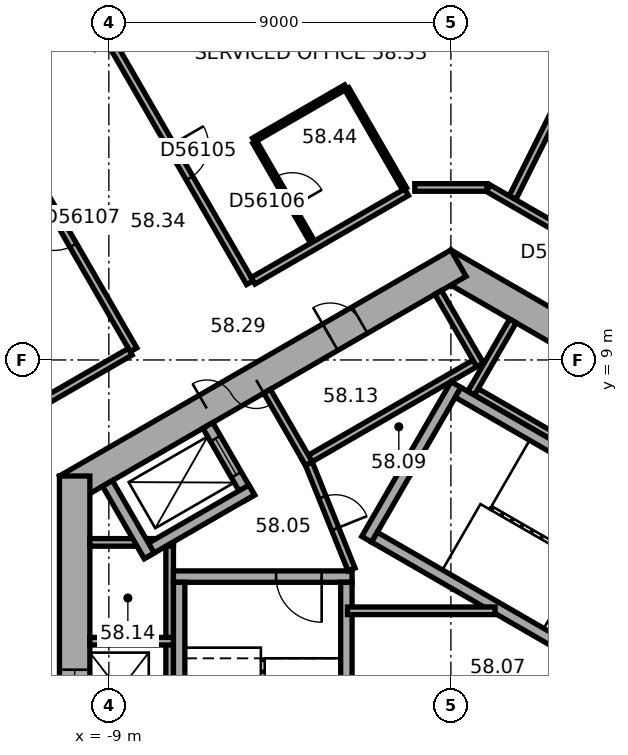
"""IFC4 building model, lengths in metres.
Left out: names, types, materials, properties, quantities, classifications, styles, units other than length and angle.
Written with IfcOpenShell. Run it as: python <this file> out.ifc"""

import sys

from ifc_helpers import new_model, si_unit, direction, frame, frame_2d, origin, place, context, subcontext, project, spatial, rectangle, extrude, element, fill, save


model = new_model("IFC4")
c1 = context("Model", 3, precision=1e-05, world=origin(), true_north=direction((0.0, 1.0)))
c2 = subcontext(c1, "Body", "Model", "MODEL_VIEW")
j1 = project(units=[si_unit("LENGTHUNIT", "METRE"), si_unit("PLANEANGLEUNIT", "RADIAN")], contexts=[c1])
p1 = place(None, origin())
s1 = spatial("IfcSite", under=j1, at=p1, CompositionType="ELEMENT")
p2 = place(p1, origin())
s2 = spatial("IfcBuilding", under=s1, at=p2, CompositionType="ELEMENT")
p3 = place(p2, frame((0.0, 0.0, 236.5)))
s3 = spatial("IfcBuildingStorey", under=s2, at=p3, CompositionType="ELEMENT", Elevation=236.5)
p4 = place(p3, frame((10.1, 5.6, 0.0), z_axis=(0.0, 0.0, 1.0), x_axis=(-0.866023897231, 0.500002609418, 0.0)))
e1 = element("IfcWall", 1, at=p4, inside=s3, PredefinedType="SHEAR", context=c2, shape_type="SweptSolid", body=[
    extrude(rectangle(XDim=11.894, YDim=0.8, at=frame_2d((5.947, 0.0))), origin(), (0.0, 0.0, 1.0), 3.7),
])
p5 = place(p4, frame((2.597, 0.0, 0.0)))
e2 = element("IfcOpeningElement", 2, at=p5, cuts=e1, PredefinedType="OPENING", context=c2, shape_type="SweptSolid", body=[
    extrude(rectangle(XDim=0.9, YDim=2.1, at=frame_2d((0.45, 1.05))), frame((0.0, 0.41, 0.0), z_axis=(0.0, -1.0, 0.0), x_axis=(1.0, 0.0, 0.0)), (0.0, 0.0, 1.0), 0.82),
])
p6 = place(p4, frame((6.497, 0.0, 0.0)))
e3 = element("IfcOpeningElement", 3, at=p6, cuts=e1, PredefinedType="OPENING", context=c2, shape_type="SweptSolid", body=[
    extrude(rectangle(XDim=0.9, YDim=2.1, at=frame_2d((0.45, 1.05))), frame((0.0, 0.41, 0.0), z_axis=(0.0, -1.0, 0.0), x_axis=(1.0, 0.0, 0.0)), (0.0, 0.0, 1.0), 0.82),
])
p7 = place(p3, frame((0.2, 11.547, 0.0), z_axis=(0.0, 0.0, 1.0), x_axis=(-0.866023897231, -0.500002609418, 0.0)))
e4 = element("IfcWall", 4, at=p7, inside=s3, PredefinedType="SHEAR", context=c2, shape_type="SweptSolid", body=[
    extrude(rectangle(XDim=11.894, YDim=0.8, at=frame_2d((5.947, 0.0))), origin(), (0.0, 0.0, 1.0), 3.7),
])
p8 = place(p7, frame((6.147, 0.0, 0.0)))
e5 = element("IfcOpeningElement", 5, at=p8, cuts=e4, PredefinedType="OPENING", context=c2, shape_type="SweptSolid", body=[
    extrude(rectangle(XDim=1.5, YDim=2.1, at=frame_2d((0.75, 1.05))), frame((0.0, 0.41, 0.0), z_axis=(0.0, -1.0, 0.0), x_axis=(1.0, 0.0, 0.0)), (0.0, 0.0, 1.0), 0.82),
])
p9 = place(p7, frame((2.997, 0.0, 0.0)))
e6 = element("IfcOpeningElement", 6, at=p9, cuts=e4, PredefinedType="OPENING", context=c2, shape_type="SweptSolid", body=[
    extrude(rectangle(XDim=0.9, YDim=2.1, at=frame_2d((0.45, 1.05))), frame((0.0, 0.41, 0.0), z_axis=(0.0, -1.0, 0.0), x_axis=(1.0, 0.0, 0.0)), (0.0, 0.0, 1.0), 0.82),
])
p10 = place(p3, frame((-9.9, 5.947, 0.0), z_axis=(0.0, 0.0, 1.0), x_axis=(0.0, -1.0, 0.0)))
e7 = element("IfcWall", 7, at=p10, inside=s3, PredefinedType="SHEAR", context=c2, shape_type="SweptSolid", body=[
    extrude(rectangle(XDim=11.894, YDim=0.8, at=frame_2d((5.947, 0.0))), origin(), (0.0, 0.0, 1.0), 3.7),
])
p11 = place(p10, frame((5.097, 0.0, 0.0)))
e8 = element("IfcOpeningElement", 8, at=p11, cuts=e7, PredefinedType="OPENING", context=c2, shape_type="SweptSolid", body=[
    extrude(rectangle(XDim=1.1, YDim=2.1, at=frame_2d((0.55, 1.05))), frame((0.0, 0.41, 0.0), z_axis=(0.0, -1.0, 0.0), x_axis=(1.0, 0.0, 0.0)), (0.0, 0.0, 1.0), 0.82),
])
p12 = place(p10, frame((7.697, 0.0, 0.0)))
e9 = element("IfcOpeningElement", 9, at=p12, cuts=e7, PredefinedType="OPENING", context=c2, shape_type="SweptSolid", body=[
    extrude(rectangle(XDim=1.1, YDim=2.1, at=frame_2d((0.55, 1.05))), frame((0.0, 0.41, 0.0), z_axis=(0.0, -1.0, 0.0), x_axis=(1.0, 0.0, 0.0)), (0.0, 0.0, 1.0), 0.82),
])
p13 = place(p3, frame((18.299, 13.727, 0.0), z_axis=(0.0, 0.0, 1.0), x_axis=(-0.894934554817, 0.44619742558, 0.0)))
e10 = element("IfcWall", 10, at=p13, inside=s3, PredefinedType="STANDARD", context=c2, shape_type="SweptSolid", body=[
    extrude(rectangle(XDim=18.841, YDim=0.2, at=frame_2d((9.421, 0.0))), origin(), (0.0, 0.0, 1.0), 3.7),
])
p14 = place(p13, frame((1.253, 0.0, 0.9)))
e11 = element("IfcOpeningElement", 11, at=p14, cuts=e10, PredefinedType="OPENING", context=c2, shape_type="SweptSolid", body=[
    extrude(rectangle(XDim=2.2, YDim=2.0, at=frame_2d((1.1, 1.0))), frame((0.0, 0.11, 0.0), z_axis=(0.0, -1.0, 0.0), x_axis=(1.0, 0.0, 0.0)), (0.0, 0.0, 1.0), 0.22),
])
p15 = place(p13, frame((4.786, 0.0, 0.9)))
e12 = element("IfcOpeningElement", 12, at=p15, cuts=e10, PredefinedType="OPENING", context=c2, shape_type="SweptSolid", body=[
    extrude(rectangle(XDim=2.2, YDim=2.0, at=frame_2d((1.1, 1.0))), frame((0.0, 0.11, 0.0), z_axis=(0.0, -1.0, 0.0), x_axis=(1.0, 0.0, 0.0)), (0.0, 0.0, 1.0), 0.22),
])
p16 = place(p13, frame((8.32, 0.0, 0.9)))
e13 = element("IfcOpeningElement", 13, at=p16, cuts=e10, PredefinedType="OPENING", context=c2, shape_type="SweptSolid", body=[
    extrude(rectangle(XDim=2.2, YDim=2.0, at=frame_2d((1.1, 1.0))), frame((0.0, 0.11, 0.0), z_axis=(0.0, -1.0, 0.0), x_axis=(1.0, 0.0, 0.0)), (0.0, 0.0, 1.0), 0.22),
])
p17 = place(p13, frame((11.854, 0.0, 0.9)))
e14 = element("IfcOpeningElement", 14, at=p17, cuts=e10, PredefinedType="OPENING", context=c2, shape_type="SweptSolid", body=[
    extrude(rectangle(XDim=2.2, YDim=2.0, at=frame_2d((1.1, 1.0))), frame((0.0, 0.11, 0.0), z_axis=(0.0, -1.0, 0.0), x_axis=(1.0, 0.0, 0.0)), (0.0, 0.0, 1.0), 0.22),
])
p18 = place(p13, frame((15.387, 0.0, 0.9)))
e15 = element("IfcOpeningElement", 15, at=p18, cuts=e10, PredefinedType="OPENING", context=c2, shape_type="SweptSolid", body=[
    extrude(rectangle(XDim=2.2, YDim=2.0, at=frame_2d((1.1, 1.0))), frame((0.0, 0.11, 0.0), z_axis=(0.0, -1.0, 0.0), x_axis=(1.0, 0.0, 0.0)), (0.0, 0.0, 1.0), 0.22),
])
p19 = place(p3, frame((-2.786, 22.005, 0.0), z_axis=(0.0, 0.0, 1.0), x_axis=(-0.866026555358, -0.49999800541, 0.0)))
e16 = element("IfcWall", 16, at=p19, inside=s3, PredefinedType="STANDARD", context=c2, shape_type="SweptSolid", body=[
    extrude(rectangle(XDim=18.841, YDim=0.2, at=frame_2d((9.421, 0.0))), origin(), (0.0, 0.0, 1.0), 3.7),
])
p20 = place(p19, frame((1.254, 0.0, 0.9)))
e17 = element("IfcOpeningElement", 17, at=p20, cuts=e16, PredefinedType="OPENING", context=c2, shape_type="SweptSolid", body=[
    extrude(rectangle(XDim=2.2, YDim=2.0, at=frame_2d((1.1, 1.0))), frame((0.0, 0.11, 0.0), z_axis=(0.0, -1.0, 0.0), x_axis=(1.0, 0.0, 0.0)), (0.0, 0.0, 1.0), 0.22),
])
p21 = place(p19, frame((4.788, 0.0, 0.9)))
e18 = element("IfcOpeningElement", 18, at=p21, cuts=e16, PredefinedType="OPENING", context=c2, shape_type="SweptSolid", body=[
    extrude(rectangle(XDim=2.2, YDim=2.0, at=frame_2d((1.1, 1.0))), frame((0.0, 0.11, 0.0), z_axis=(0.0, -1.0, 0.0), x_axis=(1.0, 0.0, 0.0)), (0.0, 0.0, 1.0), 0.22),
])
p22 = place(p19, frame((8.321, 0.0, 0.9)))
e19 = element("IfcOpeningElement", 19, at=p22, cuts=e16, PredefinedType="OPENING", context=c2, shape_type="SweptSolid", body=[
    extrude(rectangle(XDim=2.2, YDim=2.0, at=frame_2d((1.1, 1.0))), frame((0.0, 0.11, 0.0), z_axis=(0.0, -1.0, 0.0), x_axis=(1.0, 0.0, 0.0)), (0.0, 0.0, 1.0), 0.22),
])
p23 = place(p19, frame((11.855, 0.0, 0.9)))
e20 = element("IfcOpeningElement", 20, at=p23, cuts=e16, PredefinedType="OPENING", context=c2, shape_type="SweptSolid", body=[
    extrude(rectangle(XDim=2.2, YDim=2.0, at=frame_2d((1.1, 1.0))), frame((0.0, 0.11, 0.0), z_axis=(0.0, -1.0, 0.0), x_axis=(1.0, 0.0, 0.0)), (0.0, 0.0, 1.0), 0.22),
])
p24 = place(p19, frame((15.389, 0.0, 0.9)))
e21 = element("IfcOpeningElement", 21, at=p24, cuts=e16, PredefinedType="OPENING", context=c2, shape_type="SweptSolid", body=[
    extrude(rectangle(XDim=2.2, YDim=2.0, at=frame_2d((1.1, 1.0))), frame((0.0, 0.11, 0.0), z_axis=(0.0, -1.0, 0.0), x_axis=(1.0, 0.0, 0.0)), (0.0, 0.0, 1.0), 0.22),
])
p25 = place(p3, frame((7.424, 4.259, 0.0), z_axis=(0.0, 0.0, 1.0), x_axis=(-0.866026010844, 0.49999894854, 0.0)))
e22 = element("IfcWall", 22, at=p25, inside=s3, PredefinedType="PARTITIONING", context=c2, shape_type="SweptSolid", body=[
    extrude(rectangle(XDim=8.0, YDim=0.2, at=frame_2d((4.0, 0.0))), origin(), (0.0, 0.0, 1.0), 3.42),
])
p26 = place(p3, frame((0.532, 8.122, 0.0), z_axis=(0.0, 0.0, 1.0), x_axis=(0.500077893725, 0.86598042715, 0.0)))
e23 = element("IfcWall", 23, at=p26, inside=s3, PredefinedType="PARTITIONING", context=c2, shape_type="SweptSolid", body=[
    extrude(rectangle(XDim=2.2, YDim=0.2, at=frame_2d((1.1, 0.0))), origin(), (0.0, 0.0, 1.0), 3.42),
])
p27 = place(p3, frame((0.803, 9.009, 0.0), z_axis=(0.0, 0.0, 1.0), x_axis=(-0.866028230842, -0.499995103361, 0.0)))
e24 = element("IfcWall", 24, at=p27, inside=s3, PredefinedType="PARTITIONING", context=c2, shape_type="SweptSolid", body=[
    extrude(rectangle(XDim=5.4, YDim=0.2, at=frame_2d((2.7, 0.0))), origin(), (0.0, 0.0, 1.0), 3.42),
])
p28 = place(p3, frame((0.767, 8.872, 0.0), z_axis=(0.0, 0.0, 1.0), x_axis=(-0.499994660107, 0.866028486751, 0.0)))
e25 = element("IfcWall", 25, at=p28, inside=s3, PredefinedType="PARTITIONING", context=c2, shape_type="SweptSolid", body=[
    extrude(rectangle(XDim=2.2, YDim=0.2, at=frame_2d((1.1, 0.0))), origin(), (0.0, 0.0, 1.0), 3.42),
])
p29 = place(p3, frame((-3.737, 6.272, 0.0), z_axis=(0.0, 0.0, 1.0), x_axis=(-0.50002983664, 0.866008176907, 0.0)))
e26 = element("IfcWall", 26, at=p29, inside=s3, PredefinedType="PARTITIONING", context=c2, shape_type="SweptSolid", body=[
    extrude(rectangle(XDim=2.2, YDim=0.2, at=frame_2d((1.1, 0.0))), origin(), (0.0, 0.0, 1.0), 3.42),
])
p30 = place(p3, frame((-7.4, 4.3, 0.0), z_axis=(0.0, 0.0, 1.0), x_axis=(0.0, -1.0, 0.0)))
e27 = element("IfcWall", 27, at=p30, inside=s3, PredefinedType="PARTITIONING", context=c2, shape_type="SweptSolid", body=[
    extrude(rectangle(XDim=8.0, YDim=0.2, at=frame_2d((4.0, 0.0))), origin(), (0.0, 0.0, 1.0), 3.42),
])
for number, where, z_axis, x_axis in (
    (28, (-7.3, 4.2, 0.0), (0.0, 0.0, 1.0), (-1.0, 0.0, 0.0)),
    (29, (-7.3, 1.6, 0.0), (0.0, 0.0, 1.0), (-1.0, 0.0, 0.0)),
):
    element("IfcWall", number, at=place(p3, frame(where, z_axis=z_axis, x_axis=x_axis)), inside=s3, PredefinedType="PARTITIONING", context=c2, shape_type="SweptSolid", body=[
        extrude(rectangle(XDim=2.2, YDim=0.2, at=frame_2d((1.1, 0.0))), origin(), (0.0, 0.0, 1.0), 3.42),
    ])
p31 = place(p3, frame((-2.216, 4.282, 0.0), z_axis=(0.0, 0.0, 1.0), x_axis=(0.499977259774, 0.866038532462, 0.0)))
e30 = element("IfcWall", 30, at=p31, inside=s3, PredefinedType="SHEAR", context=c2, shape_type="SweptSolid", body=[
    extrude(rectangle(XDim=4.7, YDim=0.3, at=frame_2d((2.35, 0.0))), origin(), (0.0, 0.0, 1.0), 3.42),
])
for number, where, z_axis, x_axis in (
    (31, (4.103, 0.807, 0.0), (0.0, 0.0, 1.0), (-0.866, 0.5, 0.0)),
    (32, (6.303, 4.617, 0.0), (0.0, 0.0, 1.0), (-0.866, 0.5, 0.0)),
):
    element("IfcWall", number, at=place(p3, frame(where, z_axis=z_axis, x_axis=x_axis)), inside=s3, PredefinedType="SHEAR", context=c2, shape_type="SweptSolid", body=[
        extrude(rectangle(XDim=7.06, YDim=0.3, at=frame_2d((3.53, 0.0))), origin(), (0.0, 0.0, 1.0), 3.42),
    ])
p32 = place(p3, frame((-2.6, 3.3, 0.0), z_axis=(0.0, 0.0, 1.0), x_axis=(-1.0, 0.0, 0.0)))
e33 = element("IfcWall", 33, at=p32, inside=s3, PredefinedType="SHEAR", context=c2, shape_type="SweptSolid", body=[
    extrude(rectangle(XDim=4.7, YDim=0.3, at=frame_2d((2.35, 0.0))), origin(), (0.0, 0.0, 1.0), 3.42),
])
p33 = place(p32, frame((0.8, 0.0, 0.0)))
e34 = element("IfcOpeningElement", 34, at=p33, cuts=e33, PredefinedType="OPENING", context=c2, shape_type="SweptSolid", body=[
    extrude(rectangle(XDim=1.2, YDim=2.1, at=frame_2d((0.6, 1.05))), frame((0.0, 0.16, 0.0), z_axis=(0.0, -1.0, 0.0), x_axis=(1.0, 0.0, 0.0)), (0.0, 0.0, 1.0), 0.32),
])
for number, where, z_axis, x_axis in (
    (35, (-2.75, 3.15, 0.0), (0.0, 0.0, 1.0), (0.0, -1.0, 0.0)),
    (36, (-7.15, 3.15, 0.0), (0.0, 0.0, 1.0), (0.0, -1.0, 0.0)),
):
    element("IfcWall", number, at=place(p3, frame(where, z_axis=z_axis, x_axis=x_axis)), inside=s3, PredefinedType="SHEAR", context=c2, shape_type="SweptSolid", body=[
        extrude(rectangle(XDim=7.06, YDim=0.3, at=frame_2d((3.53, 0.0))), origin(), (0.0, 0.0, 1.0), 3.42),
    ])
p34 = place(p3, frame((-5.295, 5.372, 0.0), z_axis=(0.0, 0.0, 1.0), x_axis=(-0.500077893725, 0.86598042715, 0.0)))
e37 = element("IfcWall", 37, at=p34, inside=s3, PredefinedType="SHEAR", context=c2, shape_type="SweptSolid", body=[
    extrude(rectangle(XDim=2.2, YDim=0.3, at=frame_2d((1.1, 0.0))), origin(), (0.0, 0.0, 1.0), 3.42),
])
p35 = place(p34, frame((0.7, 0.0, 0.0)))
e38 = element("IfcOpeningElement", 38, at=p35, cuts=e37, PredefinedType="OPENING", context=c2, shape_type="SweptSolid", body=[
    extrude(rectangle(XDim=1.1, YDim=2.1, at=frame_2d((0.55, 1.05))), frame((0.0, 0.16, 0.0), z_axis=(0.0, -1.0, 0.0), x_axis=(1.0, 0.0, 0.0)), (0.0, 0.0, 1.0), 0.32),
])
p36 = place(p3, frame((-5.24, 5.577, 0.0), z_axis=(0.0, 0.0, 1.0), x_axis=(-0.866014461049, -0.500018952895, 0.0)))
e39 = element("IfcWall", 39, at=p36, inside=s3, PredefinedType="SHEAR", context=c2, shape_type="SweptSolid", body=[
    extrude(rectangle(XDim=3.35, YDim=0.3, at=frame_2d((1.675, 0.0))), origin(), (0.0, 0.0, 1.0), 3.42),
])
p37 = place(p3, frame((-7.937, 3.847, 0.0), z_axis=(0.0, 0.0, 1.0), x_axis=(-0.50002983664, 0.866008176907, 0.0)))
e40 = element("IfcWall", 40, at=p37, inside=s3, PredefinedType="SHEAR", context=c2, shape_type="SweptSolid", body=[
    extrude(rectangle(XDim=2.2, YDim=0.3, at=frame_2d((1.1, 0.0))), origin(), (0.0, 0.0, 1.0), 3.42),
])
p38 = place(p3, frame((-2.615, 3.487, 0.0), z_axis=(0.0, 0.0, 1.0), x_axis=(-0.373576831041, 0.92759924068, 0.0)))
e41 = element("IfcWall", 41, at=p38, inside=s3, PredefinedType="PARTITIONING", context=c2, shape_type="SweptSolid", body=[
    extrude(rectangle(XDim=3.002, YDim=0.2, at=frame_2d((1.501, 0.0))), origin(), (0.0, 0.0, 1.0), 3.42),
])
p39 = place(p38, frame((1.15, 0.0, 0.0)))
e42 = element("IfcOpeningElement", 42, at=p39, cuts=e41, PredefinedType="OPENING", context=c2, shape_type="SweptSolid", body=[
    extrude(rectangle(XDim=0.9, YDim=2.1, at=frame_2d((0.45, 1.05))), frame((0.0, 0.11, 0.0), z_axis=(0.0, -1.0, 0.0), x_axis=(1.0, 0.0, 0.0)), (0.0, 0.0, 1.0), 0.22),
])
p40 = place(p3, frame((-2.72, 2.4, 0.0), z_axis=(0.0, 0.0, 1.0), x_axis=(1.0, 0.0, 0.0)))
e43 = element("IfcWall", 43, at=p40, inside=s3, PredefinedType="PARTITIONING", context=c2, shape_type="SweptSolid", body=[
    extrude(rectangle(XDim=3.883, YDim=0.2, at=frame_2d((1.941, 0.0))), origin(), (0.0, 0.0, 1.0), 3.42),
])
p41 = place(p3, frame((-12.025, 15.632, 0.0), z_axis=(0.0, 0.0, 1.0), x_axis=(0.499983153418, -0.866035129944, 0.0)))
e44 = element("IfcWall", 44, at=p41, inside=s3, PredefinedType="PARTITIONING", context=c2, shape_type="SweptSolid", body=[
    extrude(rectangle(XDim=7.35, YDim=0.2, at=frame_2d((3.675, 0.0))), origin(), (0.0, 0.0, 1.0), 3.42),
])
p42 = place(p41, frame((3.175, 0.0, 0.0)))
e45 = element("IfcOpeningElement", 45, at=p42, cuts=e44, PredefinedType="OPENING", context=c2, shape_type="SweptSolid", body=[
    extrude(rectangle(XDim=1.0, YDim=2.1, at=frame_2d((0.5, 1.05))), frame((0.0, 0.11, 0.0), z_axis=(0.0, -1.0, 0.0), x_axis=(1.0, 0.0, 0.0)), (0.0, 0.0, 1.0), 0.22),
])
p43 = place(p3, frame((-8.965, 17.399, 0.0), z_axis=(0.0, 0.0, 1.0), x_axis=(0.499993683172, -0.866029050776, 0.0)))
e46 = element("IfcWall", 46, at=p43, inside=s3, PredefinedType="PARTITIONING", context=c2, shape_type="SweptSolid", body=[
    extrude(rectangle(XDim=7.35, YDim=0.2, at=frame_2d((3.675, 0.0))), origin(), (0.0, 0.0, 1.0), 2.87),
])
p44 = place(p43, frame((3.175, 0.0, 0.0)))
e47 = element("IfcOpeningElement", 47, at=p44, cuts=e46, PredefinedType="OPENING", context=c2, shape_type="SweptSolid", body=[
    extrude(rectangle(XDim=1.0, YDim=2.1, at=frame_2d((0.5, 1.05))), frame((0.0, 0.11, 0.0), z_axis=(0.0, -1.0, 0.0), x_axis=(1.0, 0.0, 0.0)), (0.0, 0.0, 1.0), 0.22),
])
p45 = place(p3, frame((-8.437, 9.217, 0.0), z_axis=(0.0, 0.0, 1.0), x_axis=(-0.866005660673, -0.500034194513, 0.0)))
e48 = element("IfcWall", 48, at=p45, inside=s3, PredefinedType="PARTITIONING", context=c2, shape_type="SweptSolid", body=[
    extrude(rectangle(XDim=3.209, YDim=0.2, at=frame_2d((1.604, 0.0))), origin(), (0.0, 0.0, 1.0), 3.42),
])
p46 = place(p3, frame((-5.191, 14.785, 0.0), z_axis=(0.0, 0.0, 1.0), x_axis=(0.866034573852, 0.49998411664, 0.0)))
e49 = element("IfcWall", 49, at=p46, inside=s3, PredefinedType="PARTITIONING", context=c2, shape_type="SweptSolid", body=[
    extrude(rectangle(XDim=2.8, YDim=0.12, at=frame_2d((1.4, 0.0))), origin(), (0.0, 0.0, 1.0), 3.42),
])
p47 = place(p3, frame((-3.641, 12.101, 0.0), z_axis=(0.0, 0.0, 1.0), x_axis=(-0.500026023896, 0.86601037836, 0.0)))
e50 = element("IfcWall", 50, at=p47, inside=s3, PredefinedType="PARTITIONING", context=c2, shape_type="SweptSolid", body=[
    extrude(rectangle(XDim=3.04, YDim=0.12, at=frame_2d((1.52, 0.0))), origin(), (0.0, 0.0, 1.0), 3.42),
])
p48 = place(p47, frame((1.07, 0.0, 0.0)))
e51 = element("IfcOpeningElement", 51, at=p48, cuts=e50, PredefinedType="OPENING", context=c2, shape_type="SweptSolid", body=[
    extrude(rectangle(XDim=0.9, YDim=2.1, at=frame_2d((0.45, 1.05))), frame((0.0, 0.07, 0.0), z_axis=(0.0, -1.0, 0.0), x_axis=(1.0, 0.0, 0.0)), (0.0, 0.0, 1.0), 0.14),
])
p49 = place(p3, frame((-2.737, 16.133, 0.0), z_axis=(0.0, 0.0, 1.0), x_axis=(0.500026023896, -0.86601037836, 0.0)))
e52 = element("IfcWall", 52, at=p49, inside=s3, PredefinedType="PARTITIONING", context=c2, shape_type="SweptSolid", body=[
    extrude(rectangle(XDim=3.04, YDim=0.12, at=frame_2d((1.52, 0.0))), origin(), (0.0, 0.0, 1.0), 3.42),
])
p50 = place(p3, frame((-1.167, 13.414, 0.0), z_axis=(0.0, 0.0, 1.0), x_axis=(-0.866023347809, -0.500003561037, 0.0)))
e53 = element("IfcWall", 53, at=p50, inside=s3, PredefinedType="PARTITIONING", context=c2, shape_type="SweptSolid", body=[
    extrude(rectangle(XDim=4.661, YDim=0.2, at=frame_2d((2.331, 0.0))), origin(), (0.0, 0.0, 1.0), 3.42),
])
p51 = place(p3, frame((0.95, 13.539, 0.0), z_axis=(0.0, 0.0, 1.0), x_axis=(-1.0, 0.0, 0.0)))
e54 = element("IfcWall", 54, at=p51, inside=s3, PredefinedType="PARTITIONING", context=c2, shape_type="SweptSolid", body=[
    extrude(rectangle(XDim=1.9, YDim=0.2, at=frame_2d((0.95, 0.0))), origin(), (0.0, 0.0, 1.0), 3.42),
])
p52 = place(p3, frame((4.723, 19.49, 0.0), z_axis=(0.0, 0.0, 1.0), x_axis=(-0.446186614574, -0.894939944898, 0.0)))
e55 = element("IfcWall", 55, at=p52, inside=s3, PredefinedType="PARTITIONING", context=c2, shape_type="SweptSolid", body=[
    extrude(rectangle(XDim=6.944, YDim=0.2, at=frame_2d((3.472, 0.0))), origin(), (0.0, 0.0, 1.0), 2.87),
])
p53 = place(p3, frame((8.505, 9.177, 0.0), z_axis=(0.0, 0.0, 1.0), x_axis=(-0.866019839902, 0.500009636803, 0.0)))
e56 = element("IfcWall", 56, at=p53, inside=s3, PredefinedType="PARTITIONING", context=c2, shape_type="SweptSolid", body=[
    extrude(rectangle(XDim=8.683, YDim=0.2, at=frame_2d((4.342, 0.0))), origin(), (0.0, 0.0, 1.0), 3.42),
])
p54 = place(p53, frame((5.73, 0.0, 0.0)))
e57 = element("IfcOpeningElement", 57, at=p54, cuts=e56, PredefinedType="OPENING", context=c2, shape_type="SweptSolid", body=[
    extrude(rectangle(XDim=1.0, YDim=2.1, at=frame_2d((0.5, 1.05))), frame((0.0, 0.11, 0.0), z_axis=(0.0, -1.0, 0.0), x_axis=(1.0, 0.0, 0.0)), (0.0, 0.0, 1.0), 0.22),
])
p55 = place(p22, origin())
e58 = element("IfcWindow", 58, at=p55, inside=s3, PartitioningType="SINGLE_PANEL", PredefinedType="WINDOW", context=c2, shape_type="SweptSolid", body=[
    extrude(rectangle(XDim=2.2, YDim=2.0, at=frame_2d((1.1, 1.0))), frame((0.0, 0.03, 0.0), z_axis=(0.0, -1.0, 0.0), x_axis=(1.0, 0.0, 0.0)), (0.0, 0.0, 1.0), 0.06),
])
fill(e19, e58)
p56 = place(p8, origin())
e59 = element("IfcDoor", 59, at=p56, inside=s3, OperationType="DOUBLE_DOOR_SINGLE_SWING", PredefinedType="DOOR", context=c2, shape_type="SweptSolid", body=[
    extrude(rectangle(XDim=1.5, YDim=2.1, at=frame_2d((0.75, 1.05))), frame((0.0, 0.025, 0.0), z_axis=(0.0, -1.0, 0.0), x_axis=(1.0, 0.0, 0.0)), (0.0, 0.0, 1.0), 0.05),
])
fill(e5, e59)
p57 = place(p33, origin())
e60 = element("IfcDoor", 60, at=p57, inside=s3, OperationType="SINGLE_SWING_RIGHT", PredefinedType="DOOR", context=c2, shape_type="SweptSolid", body=[
    extrude(rectangle(XDim=1.2, YDim=2.1, at=frame_2d((0.6, 1.05))), frame((0.0, 0.025, 0.0), z_axis=(0.0, -1.0, 0.0), x_axis=(1.0, 0.0, 0.0)), (0.0, 0.0, 1.0), 0.05),
])
fill(e34, e60)
p58 = place(p39, origin())
e61 = element("IfcDoor", 61, at=p58, inside=s3, OperationType="SINGLE_SWING_LEFT", PredefinedType="DOOR", context=c2, shape_type="SweptSolid", body=[
    extrude(rectangle(XDim=0.9, YDim=2.1, at=frame_2d((0.45, 1.05))), frame((0.0, 0.025, 0.0), z_axis=(0.0, -1.0, 0.0), x_axis=(1.0, 0.0, 0.0)), (0.0, 0.0, 1.0), 0.05),
])
fill(e42, e61)
p59 = place(p9, origin())
e62 = element("IfcDoor", 62, at=p59, inside=s3, OperationType="SINGLE_SWING_LEFT", PredefinedType="DOOR", context=c2, shape_type="SweptSolid", body=[
    extrude(rectangle(XDim=0.9, YDim=2.1, at=frame_2d((0.45, 1.05))), frame((0.0, 0.025, 0.0), z_axis=(0.0, -1.0, 0.0), x_axis=(1.0, 0.0, 0.0)), (0.0, 0.0, 1.0), 0.05),
])
fill(e6, e62)
p60 = place(p35, origin())
e63 = element("IfcDoor", 63, at=p60, inside=s3, OperationType="DOUBLE_DOOR_SLIDING", PredefinedType="DOOR", context=c2, shape_type="SweptSolid", body=[
    extrude(rectangle(XDim=1.1, YDim=2.1, at=frame_2d((0.55, 1.05))), frame((0.0, 0.025, 0.0), z_axis=(0.0, -1.0, 0.0), x_axis=(1.0, 0.0, 0.0)), (0.0, 0.0, 1.0), 0.05),
])
fill(e38, e63)
p61 = place(p11, origin())
e64 = element("IfcDoor", 64, at=p61, inside=s3, OperationType="DOUBLE_DOOR_SLIDING", PredefinedType="DOOR", context=c2, shape_type="SweptSolid", body=[
    extrude(rectangle(XDim=1.1, YDim=2.1, at=frame_2d((0.55, 1.05))), frame((0.0, 0.025, 0.0), z_axis=(0.0, -1.0, 0.0), x_axis=(1.0, 0.0, 0.0)), (0.0, 0.0, 1.0), 0.05),
])
fill(e8, e64)
p62 = place(p44, origin())
e65 = element("IfcDoor", 65, at=p62, inside=s3, OperationType="SINGLE_SWING_LEFT", PredefinedType="DOOR", context=c2, shape_type="SweptSolid", body=[
    extrude(rectangle(XDim=1.0, YDim=2.1, at=frame_2d((0.5, 1.05))), frame((0.0, 0.025, 0.0), z_axis=(0.0, -1.0, 0.0), x_axis=(1.0, 0.0, 0.0)), (0.0, 0.0, 1.0), 0.05),
])
fill(e47, e65)
p63 = place(p48, origin())
e66 = element("IfcDoor", 66, at=p63, inside=s3, OperationType="SINGLE_SWING_LEFT", PredefinedType="DOOR", context=c2, shape_type="SweptSolid", body=[
    extrude(rectangle(XDim=0.9, YDim=2.1, at=frame_2d((0.45, 1.05))), frame((0.0, 0.025, 0.0), z_axis=(0.0, -1.0, 0.0), x_axis=(1.0, 0.0, 0.0)), (0.0, 0.0, 1.0), 0.05),
])
fill(e51, e66)
p64 = place(p42, origin())
e67 = element("IfcDoor", 67, at=p64, inside=s3, OperationType="SINGLE_SWING_LEFT", PredefinedType="DOOR", context=c2, shape_type="SweptSolid", body=[
    extrude(rectangle(XDim=1.0, YDim=2.1, at=frame_2d((0.5, 1.05))), frame((0.0, 0.025, 0.0), z_axis=(0.0, -1.0, 0.0), x_axis=(1.0, 0.0, 0.0)), (0.0, 0.0, 1.0), 0.05),
])
fill(e45, e67)
save(model, sys.argv[1])
